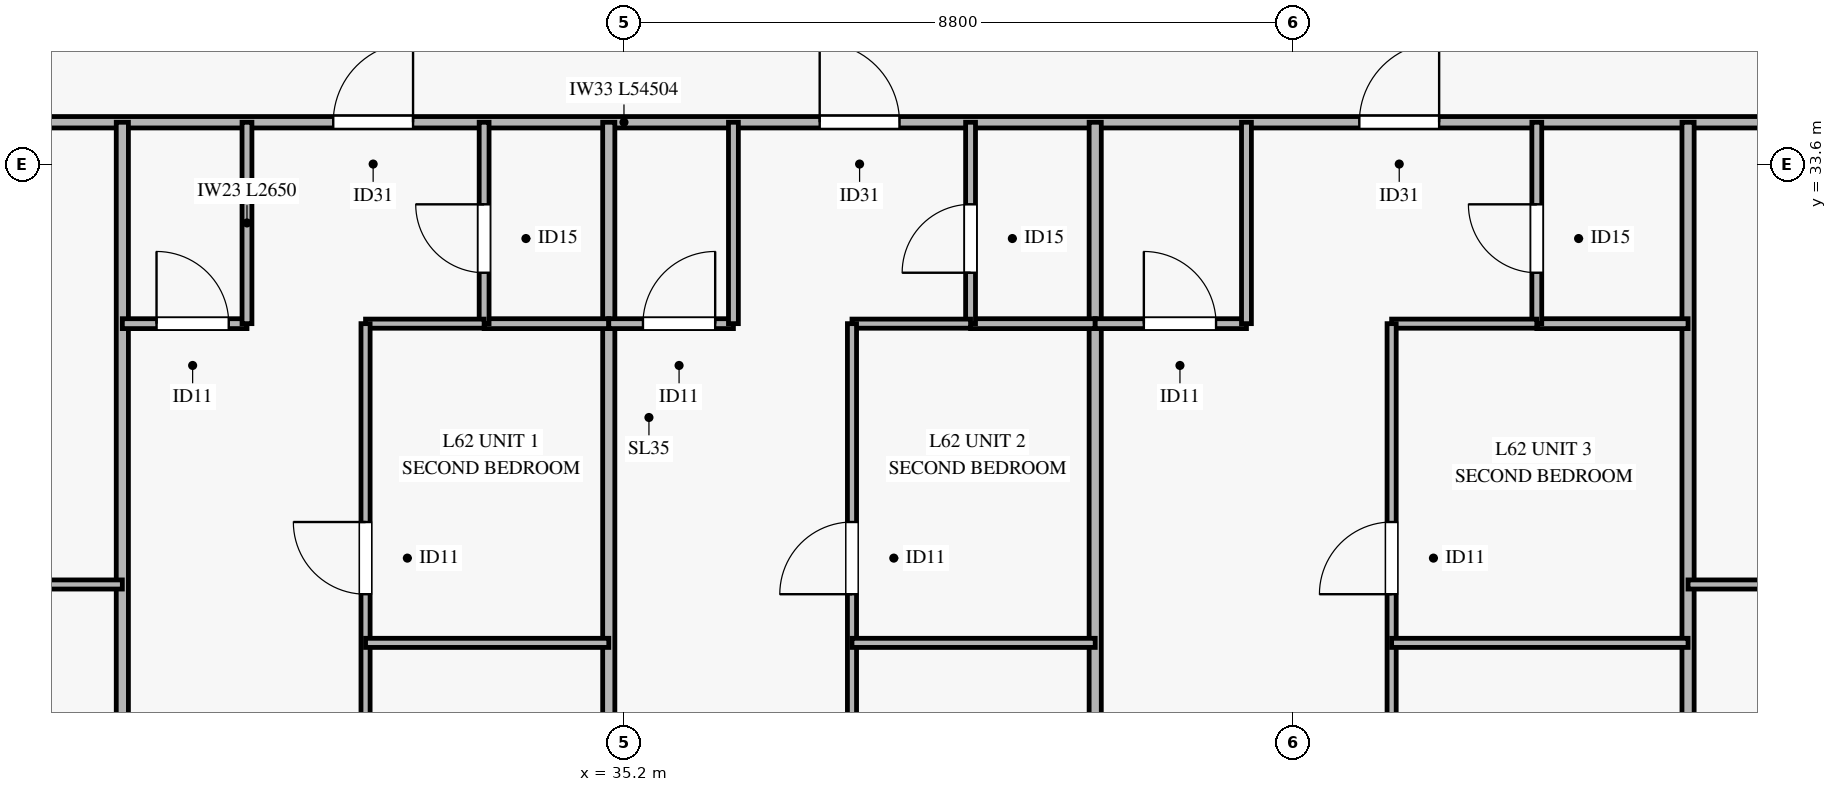
"""IFC4 building model, lengths in metres.
Left out: names, types, materials, properties, quantities, classifications, styles, units other than length and angle.
Written with IfcOpenShell. Run it as: python <this file> out.ifc"""

import sys

from ifc_helpers import new_model, si_unit, direction, frame, frame_2d, origin, place, context, subcontext, project, spatial, rectangle, extrude, source, transform, mapped, element, fill, save


model = new_model("IFC4")
c1 = context("Model", 3, precision=1e-05, world=origin(), true_north=direction((0.0, 1.0)))
c2 = subcontext(c1, "Body", "Model", "MODEL_VIEW")
j1 = project(units=[si_unit("LENGTHUNIT", "METRE"), si_unit("PLANEANGLEUNIT", "RADIAN")], contexts=[c1])
p1 = place(None, origin())
s1 = spatial("IfcSite", under=j1, at=p1, CompositionType="ELEMENT")
p2 = place(p1, origin())
s2 = spatial("IfcBuilding", under=s1, at=p2, CompositionType="ELEMENT")
p3 = place(p2, frame((0.0, 0.0, 245.1)))
s3 = spatial("IfcBuildingStorey", under=s2, at=p3, CompositionType="ELEMENT", Elevation=245.1)
p4 = place(p3, frame((7.948, 34.15, 0.0), z_axis=(0.0, 0.0, 1.0), x_axis=(1.0, 0.0, 0.0)))
e1 = element("IfcWall", 1, at=p4, inside=s3, PredefinedType="PARTITIONING", context=c2, shape_type="SweptSolid", body=[
    extrude(rectangle(XDim=54.504, YDim=0.15, at=frame_2d((27.252, 0.0))), origin(), (0.0, 0.0, 1.0), 2.47),
])
p5 = place(p4, frame((6.043, 0.0, 0.0)))
e2 = element("IfcOpeningElement", 2, at=p5, cuts=e1, PredefinedType="OPENING", context=c2, shape_type="SweptSolid", body=[
    extrude(rectangle(XDim=1.05, YDim=2.15, at=frame_2d((0.525, 1.075))), frame((0.0, 0.085, 0.0), z_axis=(0.0, -1.0, 0.0), x_axis=(1.0, 0.0, 0.0)), (0.0, 0.0, 1.0), 0.17),
])
p6 = place(p4, frame((16.977, 0.0, 0.0)))
e3 = element("IfcOpeningElement", 3, at=p6, cuts=e1, PredefinedType="OPENING", context=c2, shape_type="SweptSolid", body=[
    extrude(rectangle(XDim=1.05, YDim=2.15, at=frame_2d((0.525, 1.075))), frame((0.0, 0.085, 0.0), z_axis=(0.0, -1.0, 0.0), x_axis=(1.0, 0.0, 0.0)), (0.0, 0.0, 1.0), 0.17),
])
p7 = place(p4, frame((23.427, 0.0, 0.0)))
e4 = element("IfcOpeningElement", 4, at=p7, cuts=e1, PredefinedType="OPENING", context=c2, shape_type="SweptSolid", body=[
    extrude(rectangle(XDim=1.05, YDim=2.15, at=frame_2d((0.525, 1.075))), frame((0.0, 0.085, 0.0), z_axis=(0.0, -1.0, 0.0), x_axis=(1.0, 0.0, 0.0)), (0.0, 0.0, 1.0), 0.17),
])
p8 = place(p4, frame((29.827, 0.0, 0.0)))
e5 = element("IfcOpeningElement", 5, at=p8, cuts=e1, PredefinedType="OPENING", context=c2, shape_type="SweptSolid", body=[
    extrude(rectangle(XDim=1.05, YDim=2.15, at=frame_2d((0.525, 1.075))), frame((0.0, 0.085, 0.0), z_axis=(0.0, -1.0, 0.0), x_axis=(1.0, 0.0, 0.0)), (0.0, 0.0, 1.0), 0.17),
])
p9 = place(p4, frame((36.927, 0.0, 0.0)))
e6 = element("IfcOpeningElement", 6, at=p9, cuts=e1, PredefinedType="OPENING", context=c2, shape_type="SweptSolid", body=[
    extrude(rectangle(XDim=1.05, YDim=2.15, at=frame_2d((0.525, 1.075))), frame((0.0, 0.085, 0.0), z_axis=(0.0, -1.0, 0.0), x_axis=(1.0, 0.0, 0.0)), (0.0, 0.0, 1.0), 0.17),
])
p10 = place(p4, frame((46.223, 0.0, 0.0)))
e7 = element("IfcOpeningElement", 7, at=p10, cuts=e1, PredefinedType="OPENING", context=c2, shape_type="SweptSolid", body=[
    extrude(rectangle(XDim=1.05, YDim=2.15, at=frame_2d((0.525, 1.075))), frame((0.0, 0.085, 0.0), z_axis=(0.0, -1.0, 0.0), x_axis=(1.0, 0.0, 0.0)), (0.0, 0.0, 1.0), 0.17),
])
for number, where, z_axis, x_axis in (
    (8, (28.6, 14.182, 0.0), (0.0, 0.0, 1.0), (0.0, 1.0, 0.0)),
    (9, (35.0, 14.182, 0.0), (0.0, 0.0, 1.0), (0.0, 1.0, 0.0)),
    (10, (41.4, 14.182, 0.0), (0.0, 0.0, 1.0), (0.0, 1.0, 0.0)),
    (11, (49.2, 14.182, 0.0), (0.0, 0.0, 1.0), (0.0, 1.0, 0.0)),
):
    element("IfcWall", number, at=place(p3, frame(where, z_axis=z_axis, x_axis=x_axis)), inside=s3, PredefinedType="PARTITIONING", context=c2, shape_type="SweptSolid", body=[
        extrude(rectangle(XDim=19.968, YDim=0.16, at=frame_2d((9.984, 0.0))), origin(), (0.0, 0.0, 1.0), 2.77),
    ])
p11 = place(p3, frame((22.4, 28.068, 0.0), z_axis=(0.0, 0.0, 1.0), x_axis=(1.0, 0.0, 0.0)))
e12 = element("IfcWall", 12, at=p11, inside=s3, PredefinedType="PARTITIONING", context=c2, shape_type="SweptSolid", body=[
    extrude(rectangle(XDim=6.2, YDim=0.12, at=frame_2d((3.1, 0.0))), origin(), (0.0, 0.0, 1.0), 3.185),
])
p12 = place(p11, frame((2.646, 0.0, 0.0)))
e13 = element("IfcOpeningElement", 13, at=p12, cuts=e12, PredefinedType="OPENING", context=c2, shape_type="SweptSolid", body=[
    extrude(rectangle(XDim=0.95, YDim=2.1, at=frame_2d((0.475, 1.05))), frame((0.0, 0.07, 0.0), z_axis=(0.0, -1.0, 0.0), x_axis=(1.0, 0.0, 0.0)), (0.0, 0.0, 1.0), 0.14),
])
p13 = place(p3, frame((28.6, 31.5, 0.0), z_axis=(0.0, 0.0, 1.0), x_axis=(1.0, 0.0, 0.0)))
e14 = element("IfcWall", 14, at=p13, inside=s3, PredefinedType="PARTITIONING", context=c2, shape_type="SweptSolid", body=[
    extrude(rectangle(XDim=1.64, YDim=0.13, at=frame_2d((0.82, 0.0))), origin(), (0.0, 0.0, 1.0), 3.185),
])
p14 = place(p13, frame((0.45, 0.0, 0.0)))
e15 = element("IfcOpeningElement", 15, at=p14, cuts=e14, PredefinedType="OPENING", context=c2, shape_type="SweptSolid", body=[
    extrude(rectangle(XDim=0.95, YDim=2.1, at=frame_2d((0.475, 1.05))), frame((0.0, 0.075, 0.0), z_axis=(0.0, -1.0, 0.0), x_axis=(1.0, 0.0, 0.0)), (0.0, 0.0, 1.0), 0.15),
])
p15 = place(p3, frame((30.24, 31.5, 0.0), z_axis=(0.0, 0.0, 1.0), x_axis=(0.0, 1.0, 0.0)))
e16 = element("IfcWall", 16, at=p15, inside=s3, PredefinedType="PARTITIONING", context=c2, shape_type="SweptSolid", body=[
    extrude(rectangle(XDim=2.65, YDim=0.13, at=frame_2d((1.325, 0.0))), origin(), (0.0, 0.0, 1.0), 2.77),
])
p16 = place(p3, frame((33.36, 31.5, 0.0), z_axis=(0.0, 0.0, 1.0), x_axis=(1.0, 0.0, 0.0)))
e17 = element("IfcWall", 17, at=p16, inside=s3, PredefinedType="PARTITIONING", context=c2, shape_type="SweptSolid", body=[
    extrude(rectangle(XDim=1.64, YDim=0.13, at=frame_2d((0.82, 0.0))), origin(), (0.0, 0.0, 1.0), 3.185),
])
p17 = place(p3, frame((33.36, 31.5, 0.0), z_axis=(0.0, 0.0, 1.0), x_axis=(0.0, 1.0, 0.0)))
e18 = element("IfcWall", 18, at=p17, inside=s3, PredefinedType="PARTITIONING", context=c2, shape_type="SweptSolid", body=[
    extrude(rectangle(XDim=2.65, YDim=0.13, at=frame_2d((1.325, 0.0))), origin(), (0.0, 0.0, 1.0), 2.77),
])
p18 = place(p17, frame((0.67, 0.0, 0.0)))
e19 = element("IfcOpeningElement", 19, at=p18, cuts=e18, PredefinedType="OPENING", context=c2, shape_type="SweptSolid", body=[
    extrude(rectangle(XDim=0.9, YDim=2.1, at=frame_2d((0.45, 1.05))), frame((0.0, 0.075, 0.0), z_axis=(0.0, -1.0, 0.0), x_axis=(1.0, 0.0, 0.0)), (0.0, 0.0, 1.0), 0.15),
])
p19 = place(p3, frame((31.8, 31.5, 0.0), z_axis=(0.0, 0.0, 1.0), x_axis=(1.0, 0.0, 0.0)))
e20 = element("IfcWall", 20, at=p19, inside=s3, PredefinedType="PARTITIONING", context=c2, shape_type="SweptSolid", body=[
    extrude(rectangle(XDim=1.56, YDim=0.12, at=frame_2d((0.78, 0.0))), origin(), (0.0, 0.0, 1.0), 3.185),
])
p20 = place(p3, frame((31.8, 14.182, 0.0), z_axis=(0.0, 0.0, 1.0), x_axis=(0.0, 1.0, 0.0)))
e21 = element("IfcWall", 21, at=p20, inside=s3, PredefinedType="PARTITIONING", context=c2, shape_type="SweptSolid", body=[
    extrude(rectangle(XDim=17.318, YDim=0.12, at=frame_2d((8.659, 0.0))), origin(), (0.0, 0.0, 1.0), 2.77),
])
p21 = place(p20, frame((2.521, 0.0, 0.0)))
e22 = element("IfcOpeningElement", 22, at=p21, cuts=e21, PredefinedType="OPENING", context=c2, shape_type="SweptSolid", body=[
    extrude(rectangle(XDim=0.95, YDim=2.1, at=frame_2d((0.475, 1.05))), frame((0.0, 0.07, 0.0), z_axis=(0.0, -1.0, 0.0), x_axis=(1.0, 0.0, 0.0)), (0.0, 0.0, 1.0), 0.14),
])
p22 = place(p20, frame((13.758, 0.0, 0.0)))
e23 = element("IfcOpeningElement", 23, at=p22, cuts=e21, PredefinedType="OPENING", context=c2, shape_type="SweptSolid", body=[
    extrude(rectangle(XDim=0.95, YDim=2.1, at=frame_2d((0.475, 1.05))), frame((0.0, 0.07, 0.0), z_axis=(0.0, -1.0, 0.0), x_axis=(1.0, 0.0, 0.0)), (0.0, 0.0, 1.0), 0.14),
])
p23 = place(p3, frame((31.8, 27.3, 0.0), z_axis=(0.0, 0.0, 1.0), x_axis=(1.0, 0.0, 0.0)))
e24 = element("IfcWall", 24, at=p23, inside=s3, PredefinedType="PARTITIONING", context=c2, shape_type="SweptSolid", body=[
    extrude(rectangle(XDim=3.2, YDim=0.12, at=frame_2d((1.6, 0.0))), origin(), (0.0, 0.0, 1.0), 3.185),
])
p24 = place(p3, frame((35.0, 31.5, 0.0), z_axis=(0.0, 0.0, 1.0), x_axis=(1.0, 0.0, 0.0)))
e25 = element("IfcWall", 25, at=p24, inside=s3, PredefinedType="PARTITIONING", context=c2, shape_type="SweptSolid", body=[
    extrude(rectangle(XDim=1.64, YDim=0.13, at=frame_2d((0.82, 0.0))), origin(), (0.0, 0.0, 1.0), 3.185),
])
p25 = place(p24, frame((0.45, 0.0, 0.0)))
e26 = element("IfcOpeningElement", 26, at=p25, cuts=e25, PredefinedType="OPENING", context=c2, shape_type="SweptSolid", body=[
    extrude(rectangle(XDim=0.95, YDim=2.1, at=frame_2d((0.475, 1.05))), frame((0.0, 0.075, 0.0), z_axis=(0.0, -1.0, 0.0), x_axis=(1.0, 0.0, 0.0)), (0.0, 0.0, 1.0), 0.15),
])
p26 = place(p3, frame((36.64, 31.5, 0.0), z_axis=(0.0, 0.0, 1.0), x_axis=(0.0, 1.0, 0.0)))
e27 = element("IfcWall", 27, at=p26, inside=s3, PredefinedType="PARTITIONING", context=c2, shape_type="SweptSolid", body=[
    extrude(rectangle(XDim=2.65, YDim=0.13, at=frame_2d((1.325, 0.0))), origin(), (0.0, 0.0, 1.0), 2.77),
])
p27 = place(p3, frame((39.76, 31.5, 0.0), z_axis=(0.0, 0.0, 1.0), x_axis=(1.0, 0.0, 0.0)))
e28 = element("IfcWall", 28, at=p27, inside=s3, PredefinedType="PARTITIONING", context=c2, shape_type="SweptSolid", body=[
    extrude(rectangle(XDim=1.64, YDim=0.13, at=frame_2d((0.82, 0.0))), origin(), (0.0, 0.0, 1.0), 3.185),
])
p28 = place(p3, frame((39.76, 31.5, 0.0), z_axis=(0.0, 0.0, 1.0), x_axis=(0.0, 1.0, 0.0)))
e29 = element("IfcWall", 29, at=p28, inside=s3, PredefinedType="PARTITIONING", context=c2, shape_type="SweptSolid", body=[
    extrude(rectangle(XDim=2.65, YDim=0.13, at=frame_2d((1.325, 0.0))), origin(), (0.0, 0.0, 1.0), 2.77),
])
p29 = place(p28, frame((0.67, 0.0, 0.0)))
e30 = element("IfcOpeningElement", 30, at=p29, cuts=e29, PredefinedType="OPENING", context=c2, shape_type="SweptSolid", body=[
    extrude(rectangle(XDim=0.9, YDim=2.1, at=frame_2d((0.45, 1.05))), frame((0.0, 0.075, 0.0), z_axis=(0.0, -1.0, 0.0), x_axis=(1.0, 0.0, 0.0)), (0.0, 0.0, 1.0), 0.15),
])
p30 = place(p3, frame((38.2, 31.5, 0.0), z_axis=(0.0, 0.0, 1.0), x_axis=(1.0, 0.0, 0.0)))
e31 = element("IfcWall", 31, at=p30, inside=s3, PredefinedType="PARTITIONING", context=c2, shape_type="SweptSolid", body=[
    extrude(rectangle(XDim=1.56, YDim=0.12, at=frame_2d((0.78, 0.0))), origin(), (0.0, 0.0, 1.0), 3.185),
])
p31 = place(p3, frame((38.2, 14.182, 0.0), z_axis=(0.0, 0.0, 1.0), x_axis=(0.0, 1.0, 0.0)))
e32 = element("IfcWall", 32, at=p31, inside=s3, PredefinedType="PARTITIONING", context=c2, shape_type="SweptSolid", body=[
    extrude(rectangle(XDim=17.318, YDim=0.12, at=frame_2d((8.659, 0.0))), origin(), (0.0, 0.0, 1.0), 2.77),
])
p32 = place(p31, frame((2.521, 0.0, 0.0)))
e33 = element("IfcOpeningElement", 33, at=p32, cuts=e32, PredefinedType="OPENING", context=c2, shape_type="SweptSolid", body=[
    extrude(rectangle(XDim=0.95, YDim=2.1, at=frame_2d((0.475, 1.05))), frame((0.0, 0.07, 0.0), z_axis=(0.0, -1.0, 0.0), x_axis=(1.0, 0.0, 0.0)), (0.0, 0.0, 1.0), 0.14),
])
p33 = place(p31, frame((13.758, 0.0, 0.0)))
e34 = element("IfcOpeningElement", 34, at=p33, cuts=e32, PredefinedType="OPENING", context=c2, shape_type="SweptSolid", body=[
    extrude(rectangle(XDim=0.95, YDim=2.1, at=frame_2d((0.475, 1.05))), frame((0.0, 0.07, 0.0), z_axis=(0.0, -1.0, 0.0), x_axis=(1.0, 0.0, 0.0)), (0.0, 0.0, 1.0), 0.14),
])
p34 = place(p3, frame((38.2, 27.3, 0.0), z_axis=(0.0, 0.0, 1.0), x_axis=(1.0, 0.0, 0.0)))
e35 = element("IfcWall", 35, at=p34, inside=s3, PredefinedType="PARTITIONING", context=c2, shape_type="SweptSolid", body=[
    extrude(rectangle(XDim=3.2, YDim=0.12, at=frame_2d((1.6, 0.0))), origin(), (0.0, 0.0, 1.0), 3.185),
])
p35 = place(p3, frame((41.4, 31.5, 0.0), z_axis=(0.0, 0.0, 1.0), x_axis=(1.0, 0.0, 0.0)))
e36 = element("IfcWall", 36, at=p35, inside=s3, PredefinedType="PARTITIONING", context=c2, shape_type="SweptSolid", body=[
    extrude(rectangle(XDim=1.99, YDim=0.13, at=frame_2d((0.995, 0.0))), origin(), (0.0, 0.0, 1.0), 3.185),
])
p36 = place(p35, frame((0.64, 0.0, 0.0)))
e37 = element("IfcOpeningElement", 37, at=p36, cuts=e36, PredefinedType="OPENING", context=c2, shape_type="SweptSolid", body=[
    extrude(rectangle(XDim=0.95, YDim=2.1, at=frame_2d((0.475, 1.05))), frame((0.0, 0.075, 0.0), z_axis=(0.0, -1.0, 0.0), x_axis=(1.0, 0.0, 0.0)), (0.0, 0.0, 1.0), 0.15),
])
p37 = place(p3, frame((43.39, 31.5, 0.0), z_axis=(0.0, 0.0, 1.0), x_axis=(0.0, 1.0, 0.0)))
e38 = element("IfcWall", 38, at=p37, inside=s3, PredefinedType="PARTITIONING", context=c2, shape_type="SweptSolid", body=[
    extrude(rectangle(XDim=2.65, YDim=0.13, at=frame_2d((1.325, 0.0))), origin(), (0.0, 0.0, 1.0), 2.77),
])
p38 = place(p3, frame((47.21, 31.5, 0.0), z_axis=(0.0, 0.0, 1.0), x_axis=(1.0, 0.0, 0.0)))
e39 = element("IfcWall", 39, at=p38, inside=s3, PredefinedType="PARTITIONING", context=c2, shape_type="SweptSolid", body=[
    extrude(rectangle(XDim=1.99, YDim=0.13, at=frame_2d((0.995, 0.0))), origin(), (0.0, 0.0, 1.0), 3.185),
])
p39 = place(p3, frame((47.21, 31.5, 0.0), z_axis=(0.0, 0.0, 1.0), x_axis=(0.0, 1.0, 0.0)))
e40 = element("IfcWall", 40, at=p39, inside=s3, PredefinedType="PARTITIONING", context=c2, shape_type="SweptSolid", body=[
    extrude(rectangle(XDim=2.65, YDim=0.13, at=frame_2d((1.325, 0.0))), origin(), (0.0, 0.0, 1.0), 2.77),
])
p40 = place(p39, frame((0.67, 0.0, 0.0)))
e41 = element("IfcOpeningElement", 41, at=p40, cuts=e40, PredefinedType="OPENING", context=c2, shape_type="SweptSolid", body=[
    extrude(rectangle(XDim=0.9, YDim=2.1, at=frame_2d((0.45, 1.05))), frame((0.0, 0.075, 0.0), z_axis=(0.0, -1.0, 0.0), x_axis=(1.0, 0.0, 0.0)), (0.0, 0.0, 1.0), 0.15),
])
p41 = place(p3, frame((45.3, 31.5, 0.0), z_axis=(0.0, 0.0, 1.0), x_axis=(1.0, 0.0, 0.0)))
e42 = element("IfcWall", 42, at=p41, inside=s3, PredefinedType="PARTITIONING", context=c2, shape_type="SweptSolid", body=[
    extrude(rectangle(XDim=1.91, YDim=0.12, at=frame_2d((0.955, 0.0))), origin(), (0.0, 0.0, 1.0), 3.185),
])
p42 = place(p3, frame((45.3, 14.182, 0.0), z_axis=(0.0, 0.0, 1.0), x_axis=(0.0, 1.0, 0.0)))
e43 = element("IfcWall", 43, at=p42, inside=s3, PredefinedType="PARTITIONING", context=c2, shape_type="SweptSolid", body=[
    extrude(rectangle(XDim=17.318, YDim=0.12, at=frame_2d((8.659, 0.0))), origin(), (0.0, 0.0, 1.0), 2.77),
])
p43 = place(p42, frame((4.801, 0.0, 0.0)))
e44 = element("IfcOpeningElement", 44, at=p43, cuts=e43, PredefinedType="OPENING", context=c2, shape_type="SweptSolid", body=[
    extrude(rectangle(XDim=0.95, YDim=2.1, at=frame_2d((0.475, 1.05))), frame((0.0, 0.07, 0.0), z_axis=(0.0, -1.0, 0.0), x_axis=(1.0, 0.0, 0.0)), (0.0, 0.0, 1.0), 0.14),
])
p44 = place(p42, frame((13.758, 0.0, 0.0)))
e45 = element("IfcOpeningElement", 45, at=p44, cuts=e43, PredefinedType="OPENING", context=c2, shape_type="SweptSolid", body=[
    extrude(rectangle(XDim=0.95, YDim=2.1, at=frame_2d((0.475, 1.05))), frame((0.0, 0.07, 0.0), z_axis=(0.0, -1.0, 0.0), x_axis=(1.0, 0.0, 0.0)), (0.0, 0.0, 1.0), 0.14),
])
p45 = place(p3, frame((45.3, 27.3, 0.0), z_axis=(0.0, 0.0, 1.0), x_axis=(1.0, 0.0, 0.0)))
e46 = element("IfcWall", 46, at=p45, inside=s3, PredefinedType="PARTITIONING", context=c2, shape_type="SweptSolid", body=[
    extrude(rectangle(XDim=3.9, YDim=0.12, at=frame_2d((1.95, 0.0))), origin(), (0.0, 0.0, 1.0), 3.185),
])
p46 = place(p3, frame((49.2, 28.068, 0.0), z_axis=(0.0, 0.0, 1.0), x_axis=(1.0, 0.0, 0.0)))
e47 = element("IfcWall", 47, at=p46, inside=s3, PredefinedType="PARTITIONING", context=c2, shape_type="SweptSolid", body=[
    extrude(rectangle(XDim=13.252, YDim=0.12, at=frame_2d((6.626, 0.0))), origin(), (0.0, 0.0, 1.0), 2.47),
])
p47 = place(p46, frame((5.221, 0.0, 0.0)))
e48 = element("IfcOpeningElement", 48, at=p47, cuts=e47, PredefinedType="OPENING", context=c2, shape_type="SweptSolid", body=[
    extrude(rectangle(XDim=0.95, YDim=2.1, at=frame_2d((0.475, 1.05))), frame((0.0, 0.07, 0.0), z_axis=(0.0, -1.0, 0.0), x_axis=(1.0, 0.0, 0.0)), (0.0, 0.0, 1.0), 0.14),
])
m1 = source(origin(), c2, "Body", "SweptSolid", [
    extrude(rectangle(XDim=1.05, YDim=2.15, at=frame_2d((0.525, 1.075))), frame((0.0, 0.025, 0.0), z_axis=(0.0, -1.0, 0.0), x_axis=(1.0, 0.0, 0.0)), (0.0, 0.0, 1.0), 0.05),
])
p48 = place(p7, origin())
e49 = element("IfcDoor", 49, at=p48, inside=s3, OperationType="SINGLE_SWING_RIGHT", PredefinedType="DOOR", context=c2, shape_type="MappedRepresentation", body=[
    mapped(m1, transform((0.0, 0.0, 0.0), x_axis=(1.0, 0.0, 0.0), y_axis=(0.0, 1.0, 0.0), z_axis=(0.0, 0.0, 1.0), scale=1.0)),
])
fill(e4, e49)
m2 = source(origin(), c2, "Body", "SweptSolid", [
    extrude(rectangle(XDim=0.95, YDim=2.1, at=frame_2d((0.475, 1.05))), frame((0.0, 0.025, 0.0), z_axis=(0.0, -1.0, 0.0), x_axis=(1.0, 0.0, 0.0)), (0.0, 0.0, 1.0), 0.05),
])
p49 = place(p14, origin())
e50 = element("IfcDoor", 50, at=p49, inside=s3, OperationType="SINGLE_SWING_LEFT", PredefinedType="DOOR", context=c2, shape_type="MappedRepresentation", body=[
    mapped(m2, transform((0.0, 0.0, 0.0), x_axis=(1.0, 0.0, 0.0), y_axis=(0.0, 1.0, 0.0), z_axis=(0.0, 0.0, 1.0), scale=1.0)),
])
fill(e15, e50)
m3 = source(origin(), c2, "Body", "SweptSolid", [
    extrude(rectangle(XDim=0.9, YDim=2.1, at=frame_2d((0.45, 1.05))), frame((0.0, 0.025, 0.0), z_axis=(0.0, -1.0, 0.0), x_axis=(1.0, 0.0, 0.0)), (0.0, 0.0, 1.0), 0.05),
])
p50 = place(p18, origin())
e51 = element("IfcDoor", 51, at=p50, inside=s3, OperationType="SINGLE_SWING_RIGHT", PredefinedType="DOOR", context=c2, shape_type="MappedRepresentation", body=[
    mapped(m3, transform((0.0, 0.0, 0.0), x_axis=(1.0, 0.0, 0.0), y_axis=(0.0, 1.0, 0.0), z_axis=(0.0, 0.0, 1.0), scale=1.0)),
])
fill(e19, e51)
p51 = place(p22, origin())
e52 = element("IfcDoor", 52, at=p51, inside=s3, OperationType="SINGLE_SWING_RIGHT", PredefinedType="DOOR", context=c2, shape_type="MappedRepresentation", body=[
    mapped(m2, transform((0.0, 0.0, 0.0), x_axis=(1.0, 0.0, 0.0), y_axis=(0.0, 1.0, 0.0), z_axis=(0.0, 0.0, 1.0), scale=1.0)),
])
fill(e23, e52)
p52 = place(p8, origin())
e53 = element("IfcDoor", 53, at=p52, inside=s3, OperationType="SINGLE_SWING_LEFT", PredefinedType="DOOR", context=c2, shape_type="MappedRepresentation", body=[
    mapped(m1, transform((0.0, 0.0, 0.0), x_axis=(1.0, 0.0, 0.0), y_axis=(0.0, 1.0, 0.0), z_axis=(0.0, 0.0, 1.0), scale=1.0)),
])
fill(e5, e53)
p53 = place(p25, origin())
e54 = element("IfcDoor", 54, at=p53, inside=s3, OperationType="SINGLE_SWING_RIGHT", PredefinedType="DOOR", context=c2, shape_type="MappedRepresentation", body=[
    mapped(m2, transform((0.0, 0.0, 0.0), x_axis=(1.0, 0.0, 0.0), y_axis=(0.0, 1.0, 0.0), z_axis=(0.0, 0.0, 1.0), scale=1.0)),
])
fill(e26, e54)
p54 = place(p29, origin())
e55 = element("IfcDoor", 55, at=p54, inside=s3, OperationType="SINGLE_SWING_LEFT", PredefinedType="DOOR", context=c2, shape_type="MappedRepresentation", body=[
    mapped(m3, transform((0.0, 0.0, 0.0), x_axis=(1.0, 0.0, 0.0), y_axis=(0.0, 1.0, 0.0), z_axis=(0.0, 0.0, 1.0), scale=1.0)),
])
fill(e30, e55)
p55 = place(p33, origin())
e56 = element("IfcDoor", 56, at=p55, inside=s3, OperationType="SINGLE_SWING_LEFT", PredefinedType="DOOR", context=c2, shape_type="MappedRepresentation", body=[
    mapped(m2, transform((0.0, 0.0, 0.0), x_axis=(1.0, 0.0, 0.0), y_axis=(0.0, 1.0, 0.0), z_axis=(0.0, 0.0, 1.0), scale=1.0)),
])
fill(e34, e56)
p56 = place(p9, origin())
e57 = element("IfcDoor", 57, at=p56, inside=s3, OperationType="SINGLE_SWING_RIGHT", PredefinedType="DOOR", context=c2, shape_type="MappedRepresentation", body=[
    mapped(m1, transform((0.0, 0.0, 0.0), x_axis=(1.0, 0.0, 0.0), y_axis=(0.0, 1.0, 0.0), z_axis=(0.0, 0.0, 1.0), scale=1.0)),
])
fill(e6, e57)
p57 = place(p36, origin())
e58 = element("IfcDoor", 58, at=p57, inside=s3, OperationType="SINGLE_SWING_LEFT", PredefinedType="DOOR", context=c2, shape_type="MappedRepresentation", body=[
    mapped(m2, transform((0.0, 0.0, 0.0), x_axis=(1.0, 0.0, 0.0), y_axis=(0.0, 1.0, 0.0), z_axis=(0.0, 0.0, 1.0), scale=1.0)),
])
fill(e37, e58)
p58 = place(p40, origin())
e59 = element("IfcDoor", 59, at=p58, inside=s3, OperationType="SINGLE_SWING_RIGHT", PredefinedType="DOOR", context=c2, shape_type="MappedRepresentation", body=[
    mapped(m3, transform((0.0, 0.0, 0.0), x_axis=(1.0, 0.0, 0.0), y_axis=(0.0, 1.0, 0.0), z_axis=(0.0, 0.0, 1.0), scale=1.0)),
])
fill(e41, e59)
p59 = place(p44, origin())
e60 = element("IfcDoor", 60, at=p59, inside=s3, OperationType="SINGLE_SWING_LEFT", PredefinedType="DOOR", context=c2, shape_type="MappedRepresentation", body=[
    mapped(m2, transform((0.0, 0.0, 0.0), x_axis=(1.0, 0.0, 0.0), y_axis=(0.0, 1.0, 0.0), z_axis=(0.0, 0.0, 1.0), scale=1.0)),
])
fill(e45, e60)
save(model, sys.argv[1])
